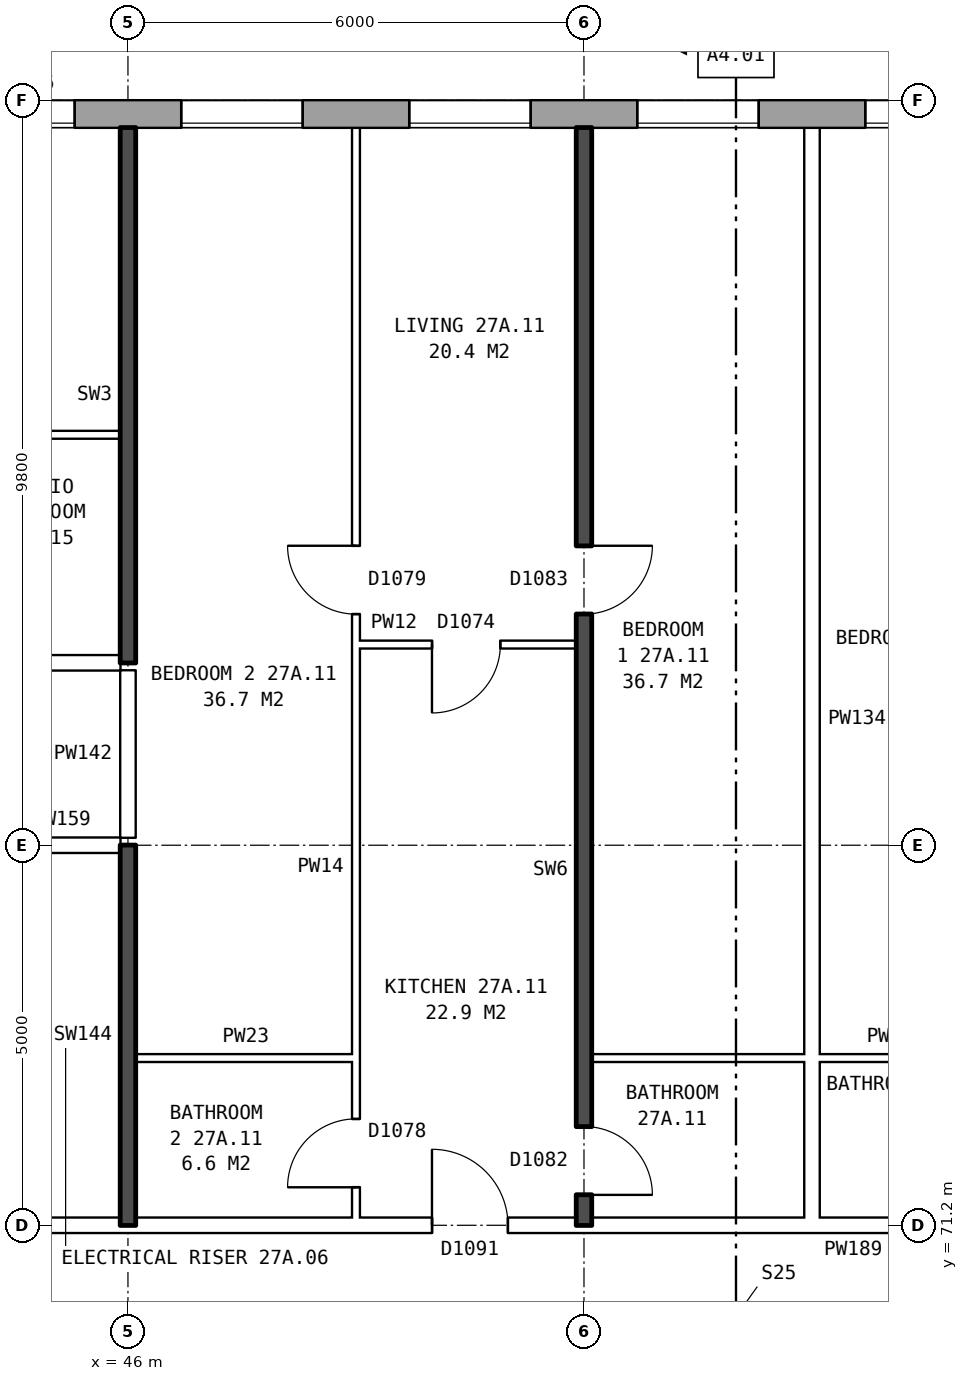
"""IFC4 building model, lengths in metres.
Left out: names, types, materials, properties, quantities, classifications, styles, units other than length and angle.
Written with IfcOpenShell. Run it as: python <this file> out.ifc"""

import sys

from ifc_helpers import new_model, si_unit, direction, frame, frame_2d, origin, place, context, subcontext, project, spatial, rectangle, extrude, element, fill, save


model = new_model("IFC4")
c1 = context("Model", 3, precision=1e-05, world=origin(), true_north=direction((0.0, 1.0)))
c2 = subcontext(c1, "Body", "Model", "MODEL_VIEW")
j1 = project(units=[si_unit("LENGTHUNIT", "METRE"), si_unit("PLANEANGLEUNIT", "RADIAN")], contexts=[c1])
p1 = place(None, origin())
s1 = spatial("IfcSite", under=j1, at=p1, CompositionType="ELEMENT")
p2 = place(p1, origin())
s2 = spatial("IfcBuilding", under=s1, at=p2, CompositionType="ELEMENT")
p3 = place(p2, frame((0.0, 0.0, 99.5)))
s3 = spatial("IfcBuildingStorey", under=s2, at=p3, CompositionType="ELEMENT", Elevation=99.5)
p4 = place(p3, frame((72.925, 85.82, 0.0), z_axis=(0.0, 0.0, 1.0), x_axis=(-1.0, 0.0, 0.0)))
e1 = element("IfcWall", 1, at=p4, inside=s3, PredefinedType="STANDARD", context=c2, shape_type="SweptSolid", body=[
    extrude(rectangle(XDim=44.851, YDim=0.36, at=frame_2d((22.425, 0.0))), origin(), (0.0, 0.0, 1.0), 2.85),
])
p5 = place(p4, frame((0.625, 0.0, 0.8)))
e2 = element("IfcOpeningElement", 2, at=p5, cuts=e1, PredefinedType="OPENING", context=c2, shape_type="SweptSolid", body=[
    extrude(rectangle(XDim=1.6, YDim=1.8, at=frame_2d((0.8, 0.9))), frame((0.0, 0.19, 0.0), z_axis=(0.0, -1.0, 0.0), x_axis=(1.0, 0.0, 0.0)), (0.0, 0.0, 1.0), 0.38),
])
p6 = place(p4, frame((5.075, 0.0, 0.8)))
e3 = element("IfcOpeningElement", 3, at=p6, cuts=e1, PredefinedType="OPENING", context=c2, shape_type="SweptSolid", body=[
    extrude(rectangle(XDim=1.2, YDim=1.2, at=frame_2d((0.6, 0.6))), frame((0.0, 0.19, 0.0), z_axis=(0.0, -1.0, 0.0), x_axis=(1.0, 0.0, 0.0)), (0.0, 0.0, 1.0), 0.38),
])
p7 = place(p4, frame((6.625, 0.0, 0.8)))
e4 = element("IfcOpeningElement", 4, at=p7, cuts=e1, PredefinedType="OPENING", context=c2, shape_type="SweptSolid", body=[
    extrude(rectangle(XDim=1.6, YDim=1.8, at=frame_2d((0.8, 0.9))), frame((0.0, 0.19, 0.0), z_axis=(0.0, -1.0, 0.0), x_axis=(1.0, 0.0, 0.0)), (0.0, 0.0, 1.0), 0.38),
])
p8 = place(p4, frame((9.625, 0.0, 0.8)))
e5 = element("IfcOpeningElement", 5, at=p8, cuts=e1, PredefinedType="OPENING", context=c2, shape_type="SweptSolid", body=[
    extrude(rectangle(XDim=1.6, YDim=1.8, at=frame_2d((0.8, 0.9))), frame((0.0, 0.19, 0.0), z_axis=(0.0, -1.0, 0.0), x_axis=(1.0, 0.0, 0.0)), (0.0, 0.0, 1.0), 0.38),
])
p9 = place(p4, frame((12.625, 0.0, 0.8)))
e6 = element("IfcOpeningElement", 6, at=p9, cuts=e1, PredefinedType="OPENING", context=c2, shape_type="SweptSolid", body=[
    extrude(rectangle(XDim=1.6, YDim=1.8, at=frame_2d((0.8, 0.9))), frame((0.0, 0.19, 0.0), z_axis=(0.0, -1.0, 0.0), x_axis=(1.0, 0.0, 0.0)), (0.0, 0.0, 1.0), 0.38),
])
p10 = place(p4, frame((15.625, 0.0, 0.8)))
e7 = element("IfcOpeningElement", 7, at=p10, cuts=e1, PredefinedType="OPENING", context=c2, shape_type="SweptSolid", body=[
    extrude(rectangle(XDim=1.6, YDim=1.8, at=frame_2d((0.8, 0.9))), frame((0.0, 0.19, 0.0), z_axis=(0.0, -1.0, 0.0), x_axis=(1.0, 0.0, 0.0)), (0.0, 0.0, 1.0), 0.38),
])
p11 = place(p4, frame((18.625, 0.0, 0.8)))
e8 = element("IfcOpeningElement", 8, at=p11, cuts=e1, PredefinedType="OPENING", context=c2, shape_type="SweptSolid", body=[
    extrude(rectangle(XDim=1.6, YDim=1.8, at=frame_2d((0.8, 0.9))), frame((0.0, 0.19, 0.0), z_axis=(0.0, -1.0, 0.0), x_axis=(1.0, 0.0, 0.0)), (0.0, 0.0, 1.0), 0.38),
])
p12 = place(p4, frame((21.625, 0.0, 0.8)))
e9 = element("IfcOpeningElement", 9, at=p12, cuts=e1, PredefinedType="OPENING", context=c2, shape_type="SweptSolid", body=[
    extrude(rectangle(XDim=1.6, YDim=1.8, at=frame_2d((0.8, 0.9))), frame((0.0, 0.19, 0.0), z_axis=(0.0, -1.0, 0.0), x_axis=(1.0, 0.0, 0.0)), (0.0, 0.0, 1.0), 0.38),
])
p13 = place(p4, frame((24.625, 0.0, 0.8)))
e10 = element("IfcOpeningElement", 10, at=p13, cuts=e1, PredefinedType="OPENING", context=c2, shape_type="SweptSolid", body=[
    extrude(rectangle(XDim=1.6, YDim=1.8, at=frame_2d((0.8, 0.9))), frame((0.0, 0.19, 0.0), z_axis=(0.0, -1.0, 0.0), x_axis=(1.0, 0.0, 0.0)), (0.0, 0.0, 1.0), 0.38),
])
p14 = place(p4, frame((27.625, 0.0, 0.8)))
e11 = element("IfcOpeningElement", 11, at=p14, cuts=e1, PredefinedType="OPENING", context=c2, shape_type="SweptSolid", body=[
    extrude(rectangle(XDim=1.6, YDim=1.8, at=frame_2d((0.8, 0.9))), frame((0.0, 0.19, 0.0), z_axis=(0.0, -1.0, 0.0), x_axis=(1.0, 0.0, 0.0)), (0.0, 0.0, 1.0), 0.38),
])
p15 = place(p4, frame((30.625, 0.0, 0.8)))
e12 = element("IfcOpeningElement", 12, at=p15, cuts=e1, PredefinedType="OPENING", context=c2, shape_type="SweptSolid", body=[
    extrude(rectangle(XDim=1.6, YDim=1.8, at=frame_2d((0.8, 0.9))), frame((0.0, 0.19, 0.0), z_axis=(0.0, -1.0, 0.0), x_axis=(1.0, 0.0, 0.0)), (0.0, 0.0, 1.0), 0.38),
])
p16 = place(p4, frame((33.625, 0.0, 0.8)))
e13 = element("IfcOpeningElement", 13, at=p16, cuts=e1, PredefinedType="OPENING", context=c2, shape_type="SweptSolid", body=[
    extrude(rectangle(XDim=1.6, YDim=1.8, at=frame_2d((0.8, 0.9))), frame((0.0, 0.19, 0.0), z_axis=(0.0, -1.0, 0.0), x_axis=(1.0, 0.0, 0.0)), (0.0, 0.0, 1.0), 0.38),
])
p17 = place(p4, frame((36.625, 0.0, 0.8)))
e14 = element("IfcOpeningElement", 14, at=p17, cuts=e1, PredefinedType="OPENING", context=c2, shape_type="SweptSolid", body=[
    extrude(rectangle(XDim=1.6, YDim=1.8, at=frame_2d((0.8, 0.9))), frame((0.0, 0.19, 0.0), z_axis=(0.0, -1.0, 0.0), x_axis=(1.0, 0.0, 0.0)), (0.0, 0.0, 1.0), 0.38),
])
p18 = place(p4, frame((39.125, 0.0, 0.8)))
e15 = element("IfcOpeningElement", 15, at=p18, cuts=e1, PredefinedType="OPENING", context=c2, shape_type="SweptSolid", body=[
    extrude(rectangle(XDim=1.0, YDim=0.9, at=frame_2d((0.5, 0.45))), frame((0.0, 0.19, 0.0), z_axis=(0.0, -1.0, 0.0), x_axis=(1.0, 0.0, 0.0)), (0.0, 0.0, 1.0), 0.38),
])
p19 = place(p4, frame((42.625, 0.0, 0.8)))
e16 = element("IfcOpeningElement", 16, at=p19, cuts=e1, PredefinedType="OPENING", context=c2, shape_type="SweptSolid", body=[
    extrude(rectangle(XDim=1.6, YDim=1.8, at=frame_2d((0.8, 0.9))), frame((0.0, 0.19, 0.0), z_axis=(0.0, -1.0, 0.0), x_axis=(1.0, 0.0, 0.0)), (0.0, 0.0, 1.0), 0.38),
])
p20 = place(p4, frame((41.425, 0.0, 1.7)))
e17 = element("IfcOpeningElement", 17, at=p20, cuts=e1, PredefinedType="OPENING", context=c2, shape_type="SweptSolid", body=[
    extrude(rectangle(XDim=0.8, YDim=0.9, at=frame_2d((0.4, 0.45))), frame((0.0, 0.19, 0.0), z_axis=(0.0, -1.0, 0.0), x_axis=(1.0, 0.0, 0.0)), (0.0, 0.0, 1.0), 0.38),
])
p21 = place(p3, frame((44.36, 71.2, 0.0), z_axis=(0.0, 0.0, 1.0), x_axis=(1.0, 0.0, 0.0)))
e18 = element("IfcWall", 18, at=p21, inside=s3, PredefinedType="PARTITIONING", context=c2, shape_type="SweptSolid", body=[
    extrude(rectangle(XDim=19.28, YDim=0.2, at=frame_2d((9.64, 0.0))), origin(), (0.0, 0.0, 1.0), 2.85),
])
p22 = place(p21, frame((14.64, 0.0, 0.0)))
e19 = element("IfcOpeningElement", 19, at=p22, cuts=e18, PredefinedType="OPENING", context=c2, shape_type="SweptSolid", body=[
    extrude(rectangle(XDim=1.0, YDim=2.1, at=frame_2d((0.5, 1.05))), frame((0.0, 0.11, 0.0), z_axis=(0.0, -1.0, 0.0), x_axis=(1.0, 0.0, 0.0)), (0.0, 0.0, 1.0), 0.22),
])
p23 = place(p21, frame((5.64, 0.0, 0.0)))
e20 = element("IfcOpeningElement", 20, at=p23, cuts=e18, PredefinedType="OPENING", context=c2, shape_type="SweptSolid", body=[
    extrude(rectangle(XDim=1.0, YDim=2.1, at=frame_2d((0.5, 1.05))), frame((0.0, 0.11, 0.0), z_axis=(0.0, -1.0, 0.0), x_axis=(1.0, 0.0, 0.0)), (0.0, 0.0, 1.0), 0.22),
])
p24 = place(p3, frame((46.1, 73.4, 0.0), z_axis=(0.0, 0.0, 1.0), x_axis=(1.0, 0.0, 0.0)))
e21 = element("IfcWall", 21, at=p24, inside=s3, PredefinedType="PARTITIONING", context=c2, shape_type="SweptSolid", body=[
    extrude(rectangle(XDim=2.9, YDim=0.1, at=frame_2d((1.45, 0.0))), origin(), (0.0, 0.0, 1.0), 2.85),
])
p25 = place(p3, frame((52.1, 73.4, 0.0), z_axis=(0.0, 0.0, 1.0), x_axis=(1.0, 0.0, 0.0)))
e22 = element("IfcWall", 22, at=p25, inside=s3, PredefinedType="PARTITIONING", context=c2, shape_type="SweptSolid", body=[
    extrude(rectangle(XDim=5.8, YDim=0.1, at=frame_2d((2.9, 0.0))), origin(), (0.0, 0.0, 1.0), 2.85),
])
p26 = place(p3, frame((44.36, 76.2, 0.0), z_axis=(0.0, 0.0, 1.0), x_axis=(1.0, 0.0, 0.0)))
e23 = element("IfcWall", 23, at=p26, inside=s3, PredefinedType="PARTITIONING", context=c2, shape_type="SweptSolid", body=[
    extrude(rectangle(XDim=1.54, YDim=0.2, at=frame_2d((0.77, 0.0))), origin(), (0.0, 0.0, 1.0), 2.85),
])
p27 = place(p3, frame((25.36, 78.6, 0.0), z_axis=(0.0, 0.0, 1.0), x_axis=(1.0, 0.0, 0.0)))
e24 = element("IfcWall", 24, at=p27, inside=s3, PredefinedType="PARTITIONING", context=c2, shape_type="SweptSolid", body=[
    extrude(rectangle(XDim=20.54, YDim=0.2, at=frame_2d((10.27, 0.0))), origin(), (0.0, 0.0, 1.0), 2.85),
])
p28 = place(p27, frame((15.94, 0.0, 0.0)))
e25 = element("IfcOpeningElement", 25, at=p28, cuts=e24, PredefinedType="OPENING", context=c2, shape_type="SweptSolid", body=[
    extrude(rectangle(XDim=1.0, YDim=2.1, at=frame_2d((0.5, 1.05))), frame((0.0, 0.11, 0.0), z_axis=(0.0, -1.0, 0.0), x_axis=(1.0, 0.0, 0.0)), (0.0, 0.0, 1.0), 0.22),
])
p29 = place(p27, frame((9.94, 0.0, 0.0)))
e26 = element("IfcOpeningElement", 26, at=p29, cuts=e24, PredefinedType="OPENING", context=c2, shape_type="SweptSolid", body=[
    extrude(rectangle(XDim=1.0, YDim=2.1, at=frame_2d((0.5, 1.05))), frame((0.0, 0.11, 0.0), z_axis=(0.0, -1.0, 0.0), x_axis=(1.0, 0.0, 0.0)), (0.0, 0.0, 1.0), 0.22),
])
p30 = place(p27, frame((2.62, 0.0, 0.0)))
e27 = element("IfcOpeningElement", 27, at=p30, cuts=e24, PredefinedType="OPENING", context=c2, shape_type="SweptSolid", body=[
    extrude(rectangle(XDim=1.0, YDim=2.1, at=frame_2d((0.5, 1.05))), frame((0.0, 0.11, 0.0), z_axis=(0.0, -1.0, 0.0), x_axis=(1.0, 0.0, 0.0)), (0.0, 0.0, 1.0), 0.22),
])
p31 = place(p3, frame((49.0, 78.84, 0.0), z_axis=(0.0, 0.0, 1.0), x_axis=(1.0, 0.0, 0.0)))
e28 = element("IfcWall", 28, at=p31, inside=s3, PredefinedType="PARTITIONING", context=c2, shape_type="SweptSolid", body=[
    extrude(rectangle(XDim=2.9, YDim=0.1, at=frame_2d((1.45, 0.0))), origin(), (0.0, 0.0, 1.0), 2.85),
])
p32 = place(p31, frame((1.0, 0.0, 0.0)))
e29 = element("IfcOpeningElement", 29, at=p32, cuts=e28, PredefinedType="OPENING", context=c2, shape_type="SweptSolid", body=[
    extrude(rectangle(XDim=0.9, YDim=2.1, at=frame_2d((0.45, 1.05))), frame((0.0, 0.06, 0.0), z_axis=(0.0, -1.0, 0.0), x_axis=(1.0, 0.0, 0.0)), (0.0, 0.0, 1.0), 0.12),
])
p33 = place(p3, frame((43.6, 81.6, 0.0), z_axis=(0.0, 0.0, 1.0), x_axis=(1.0, 0.0, 0.0)))
e30 = element("IfcWall", 30, at=p33, inside=s3, PredefinedType="PARTITIONING", context=c2, shape_type="SweptSolid", body=[
    extrude(rectangle(XDim=2.3, YDim=0.1, at=frame_2d((1.15, 0.0))), origin(), (0.0, 0.0, 1.0), 2.85),
])
p34 = place(p3, frame((46.0, 71.2, 0.0), z_axis=(0.0, 0.0, 1.0), x_axis=(0.0, 1.0, 0.0)))
e31 = element("IfcWall", 31, at=p34, inside=s3, PredefinedType="SOLIDWALL", context=c2, shape_type="SweptSolid", body=[
    extrude(rectangle(XDim=5.0, YDim=0.2, at=frame_2d((2.5, 0.0))), origin(), (0.0, 0.0, 1.0), 2.85),
])
p35 = place(p3, frame((46.0, 76.3, 0.0), z_axis=(0.0, 0.0, 1.0), x_axis=(0.0, 1.0, 0.0)))
e32 = element("IfcWall", 32, at=p35, inside=s3, PredefinedType="PARTITIONING", context=c2, shape_type="SweptSolid", body=[
    extrude(rectangle(XDim=2.2, YDim=0.2, at=frame_2d((1.1, 0.0))), origin(), (0.0, 0.0, 1.0), 2.85),
])
p36 = place(p3, frame((46.0, 78.6, 0.0), z_axis=(0.0, 0.0, 1.0), x_axis=(0.0, 1.0, 0.0)))
e33 = element("IfcWall", 33, at=p36, inside=s3, PredefinedType="SOLIDWALL", context=c2, shape_type="SweptSolid", body=[
    extrude(rectangle(XDim=7.04, YDim=0.2, at=frame_2d((3.52, 0.0))), origin(), (0.0, 0.0, 1.0), 2.85),
])
p37 = place(p3, frame((49.0, 71.3, 0.0), z_axis=(0.0, 0.0, 1.0), x_axis=(0.0, 1.0, 0.0)))
e34 = element("IfcWall", 34, at=p37, inside=s3, PredefinedType="PARTITIONING", context=c2, shape_type="SweptSolid", body=[
    extrude(rectangle(XDim=14.34, YDim=0.1, at=frame_2d((7.17, 0.0))), origin(), (0.0, 0.0, 1.0), 2.85),
])
p38 = place(p37, frame((7.94, 0.0, 0.0)))
e35 = element("IfcOpeningElement", 35, at=p38, cuts=e34, PredefinedType="OPENING", context=c2, shape_type="SweptSolid", body=[
    extrude(rectangle(XDim=0.9, YDim=2.1, at=frame_2d((0.45, 1.05))), frame((0.0, 0.06, 0.0), z_axis=(0.0, -1.0, 0.0), x_axis=(1.0, 0.0, 0.0)), (0.0, 0.0, 1.0), 0.12),
])
p39 = place(p37, frame((0.4, 0.0, 0.0)))
e36 = element("IfcOpeningElement", 36, at=p39, cuts=e34, PredefinedType="OPENING", context=c2, shape_type="SweptSolid", body=[
    extrude(rectangle(XDim=0.9, YDim=2.1, at=frame_2d((0.45, 1.05))), frame((0.0, 0.06, 0.0), z_axis=(0.0, -1.0, 0.0), x_axis=(1.0, 0.0, 0.0)), (0.0, 0.0, 1.0), 0.12),
])
p40 = place(p3, frame((52.0, 71.2, 0.0), z_axis=(0.0, 0.0, 1.0), x_axis=(0.0, 1.0, 0.0)))
e37 = element("IfcWall", 37, at=p40, inside=s3, PredefinedType="SOLIDWALL", context=c2, shape_type="SweptSolid", body=[
    extrude(rectangle(XDim=14.44, YDim=0.2, at=frame_2d((7.22, 0.0))), origin(), (0.0, 0.0, 1.0), 2.85),
])
p41 = place(p40, frame((8.04, 0.0, 0.0)))
e38 = element("IfcOpeningElement", 38, at=p41, cuts=e37, PredefinedType="OPENING", context=c2, shape_type="SweptSolid", body=[
    extrude(rectangle(XDim=0.9, YDim=2.1, at=frame_2d((0.45, 1.05))), frame((0.0, 0.11, 0.0), z_axis=(0.0, -1.0, 0.0), x_axis=(1.0, 0.0, 0.0)), (0.0, 0.0, 1.0), 0.22),
])
p42 = place(p40, frame((0.4, 0.0, 0.0)))
e39 = element("IfcOpeningElement", 39, at=p42, cuts=e37, PredefinedType="OPENING", context=c2, shape_type="SweptSolid", body=[
    extrude(rectangle(XDim=0.9, YDim=2.1, at=frame_2d((0.45, 1.05))), frame((0.0, 0.11, 0.0), z_axis=(0.0, -1.0, 0.0), x_axis=(1.0, 0.0, 0.0)), (0.0, 0.0, 1.0), 0.22),
])
p43 = place(p3, frame((55.0, 71.3, 0.0), z_axis=(0.0, 0.0, 1.0), x_axis=(0.0, 1.0, 0.0)))
e40 = element("IfcWall", 40, at=p43, inside=s3, PredefinedType="PARTITIONING", context=c2, shape_type="SweptSolid", body=[
    extrude(rectangle(XDim=14.34, YDim=0.2, at=frame_2d((7.17, 0.0))), origin(), (0.0, 0.0, 1.0), 2.85),
])
p44 = place(p10, origin())
e41 = element("IfcWindow", 41, at=p44, inside=s3, PartitioningType="SINGLE_PANEL", PredefinedType="WINDOW", context=c2, shape_type="SweptSolid", body=[
    extrude(rectangle(XDim=1.6, YDim=1.8, at=frame_2d((0.8, 0.9))), frame((0.0, 0.15, 0.0), z_axis=(0.0, -1.0, 0.0), x_axis=(1.0, 0.0, 0.0)), (0.0, 0.0, 1.0), 0.06),
])
fill(e7, e41)
p45 = place(p11, origin())
e42 = element("IfcWindow", 42, at=p45, inside=s3, PartitioningType="SINGLE_PANEL", PredefinedType="WINDOW", context=c2, shape_type="SweptSolid", body=[
    extrude(rectangle(XDim=1.6, YDim=1.8, at=frame_2d((0.8, 0.9))), frame((0.0, 0.15, 0.0), z_axis=(0.0, -1.0, 0.0), x_axis=(1.0, 0.0, 0.0)), (0.0, 0.0, 1.0), 0.06),
])
fill(e8, e42)
p46 = place(p12, origin())
e43 = element("IfcWindow", 43, at=p46, inside=s3, PartitioningType="SINGLE_PANEL", PredefinedType="WINDOW", context=c2, shape_type="SweptSolid", body=[
    extrude(rectangle(XDim=1.6, YDim=1.8, at=frame_2d((0.8, 0.9))), frame((0.0, 0.15, 0.0), z_axis=(0.0, -1.0, 0.0), x_axis=(1.0, 0.0, 0.0)), (0.0, 0.0, 1.0), 0.06),
])
fill(e9, e43)
p47 = place(p13, origin())
e44 = element("IfcWindow", 44, at=p47, inside=s3, PartitioningType="SINGLE_PANEL", PredefinedType="WINDOW", context=c2, shape_type="SweptSolid", body=[
    extrude(rectangle(XDim=1.6, YDim=1.8, at=frame_2d((0.8, 0.9))), frame((0.0, 0.15, 0.0), z_axis=(0.0, -1.0, 0.0), x_axis=(1.0, 0.0, 0.0)), (0.0, 0.0, 1.0), 0.06),
])
fill(e10, e44)
p48 = place(p14, origin())
e45 = element("IfcWindow", 45, at=p48, inside=s3, PartitioningType="SINGLE_PANEL", PredefinedType="WINDOW", context=c2, shape_type="SweptSolid", body=[
    extrude(rectangle(XDim=1.6, YDim=1.8, at=frame_2d((0.8, 0.9))), frame((0.0, 0.15, 0.0), z_axis=(0.0, -1.0, 0.0), x_axis=(1.0, 0.0, 0.0)), (0.0, 0.0, 1.0), 0.06),
])
fill(e11, e45)
p49 = place(p41, frame((0.9, 0.0, 0.0), z_axis=(0.0, 0.0, 1.0), x_axis=(-1.0, 0.0, 0.0)))
e46 = element("IfcDoor", 46, at=p49, inside=s3, OperationType="SINGLE_SWING_LEFT", PredefinedType="DOOR", context=c2, shape_type="SweptSolid", body=[
    extrude(rectangle(XDim=0.9, YDim=2.1, at=frame_2d((0.45, 1.05))), frame((0.0, 0.025, 0.0), z_axis=(0.0, -1.0, 0.0), x_axis=(1.0, 0.0, 0.0)), (0.0, 0.0, 1.0), 0.05),
])
fill(e38, e46)
p50 = place(p38, origin())
e47 = element("IfcDoor", 47, at=p50, inside=s3, OperationType="SINGLE_SWING_RIGHT", PredefinedType="DOOR", context=c2, shape_type="SweptSolid", body=[
    extrude(rectangle(XDim=0.9, YDim=2.1, at=frame_2d((0.45, 1.05))), frame((0.0, 0.025, 0.0), z_axis=(0.0, -1.0, 0.0), x_axis=(1.0, 0.0, 0.0)), (0.0, 0.0, 1.0), 0.05),
])
fill(e35, e47)
p51 = place(p23, origin())
e48 = element("IfcDoor", 48, at=p51, inside=s3, OperationType="SINGLE_SWING_LEFT", PredefinedType="DOOR", context=c2, shape_type="SweptSolid", body=[
    extrude(rectangle(XDim=1.0, YDim=2.1, at=frame_2d((0.5, 1.05))), frame((0.0, 0.025, 0.0), z_axis=(0.0, -1.0, 0.0), x_axis=(1.0, 0.0, 0.0)), (0.0, 0.0, 1.0), 0.05),
])
fill(e20, e48)
p52 = place(p32, frame((0.9, 0.0, 0.0), z_axis=(0.0, 0.0, 1.0), x_axis=(-1.0, 0.0, 0.0)))
e49 = element("IfcDoor", 49, at=p52, inside=s3, OperationType="SINGLE_SWING_RIGHT", PredefinedType="DOOR", context=c2, shape_type="SweptSolid", body=[
    extrude(rectangle(XDim=0.9, YDim=2.1, at=frame_2d((0.45, 1.05))), frame((0.0, 0.025, 0.0), z_axis=(0.0, -1.0, 0.0), x_axis=(1.0, 0.0, 0.0)), (0.0, 0.0, 1.0), 0.05),
])
fill(e29, e49)
p53 = place(p42, frame((0.9, 0.0, 0.0), z_axis=(0.0, 0.0, 1.0), x_axis=(-1.0, 0.0, 0.0)))
e50 = element("IfcDoor", 50, at=p53, inside=s3, OperationType="SINGLE_SWING_RIGHT", PredefinedType="DOOR", context=c2, shape_type="SweptSolid", body=[
    extrude(rectangle(XDim=0.9, YDim=2.1, at=frame_2d((0.45, 1.05))), frame((0.0, 0.025, 0.0), z_axis=(0.0, -1.0, 0.0), x_axis=(1.0, 0.0, 0.0)), (0.0, 0.0, 1.0), 0.05),
])
fill(e39, e50)
p54 = place(p39, origin())
e51 = element("IfcDoor", 51, at=p54, inside=s3, OperationType="SINGLE_SWING_LEFT", PredefinedType="DOOR", context=c2, shape_type="SweptSolid", body=[
    extrude(rectangle(XDim=0.9, YDim=2.1, at=frame_2d((0.45, 1.05))), frame((0.0, 0.025, 0.0), z_axis=(0.0, -1.0, 0.0), x_axis=(1.0, 0.0, 0.0)), (0.0, 0.0, 1.0), 0.05),
])
fill(e36, e51)
save(model, sys.argv[1])
